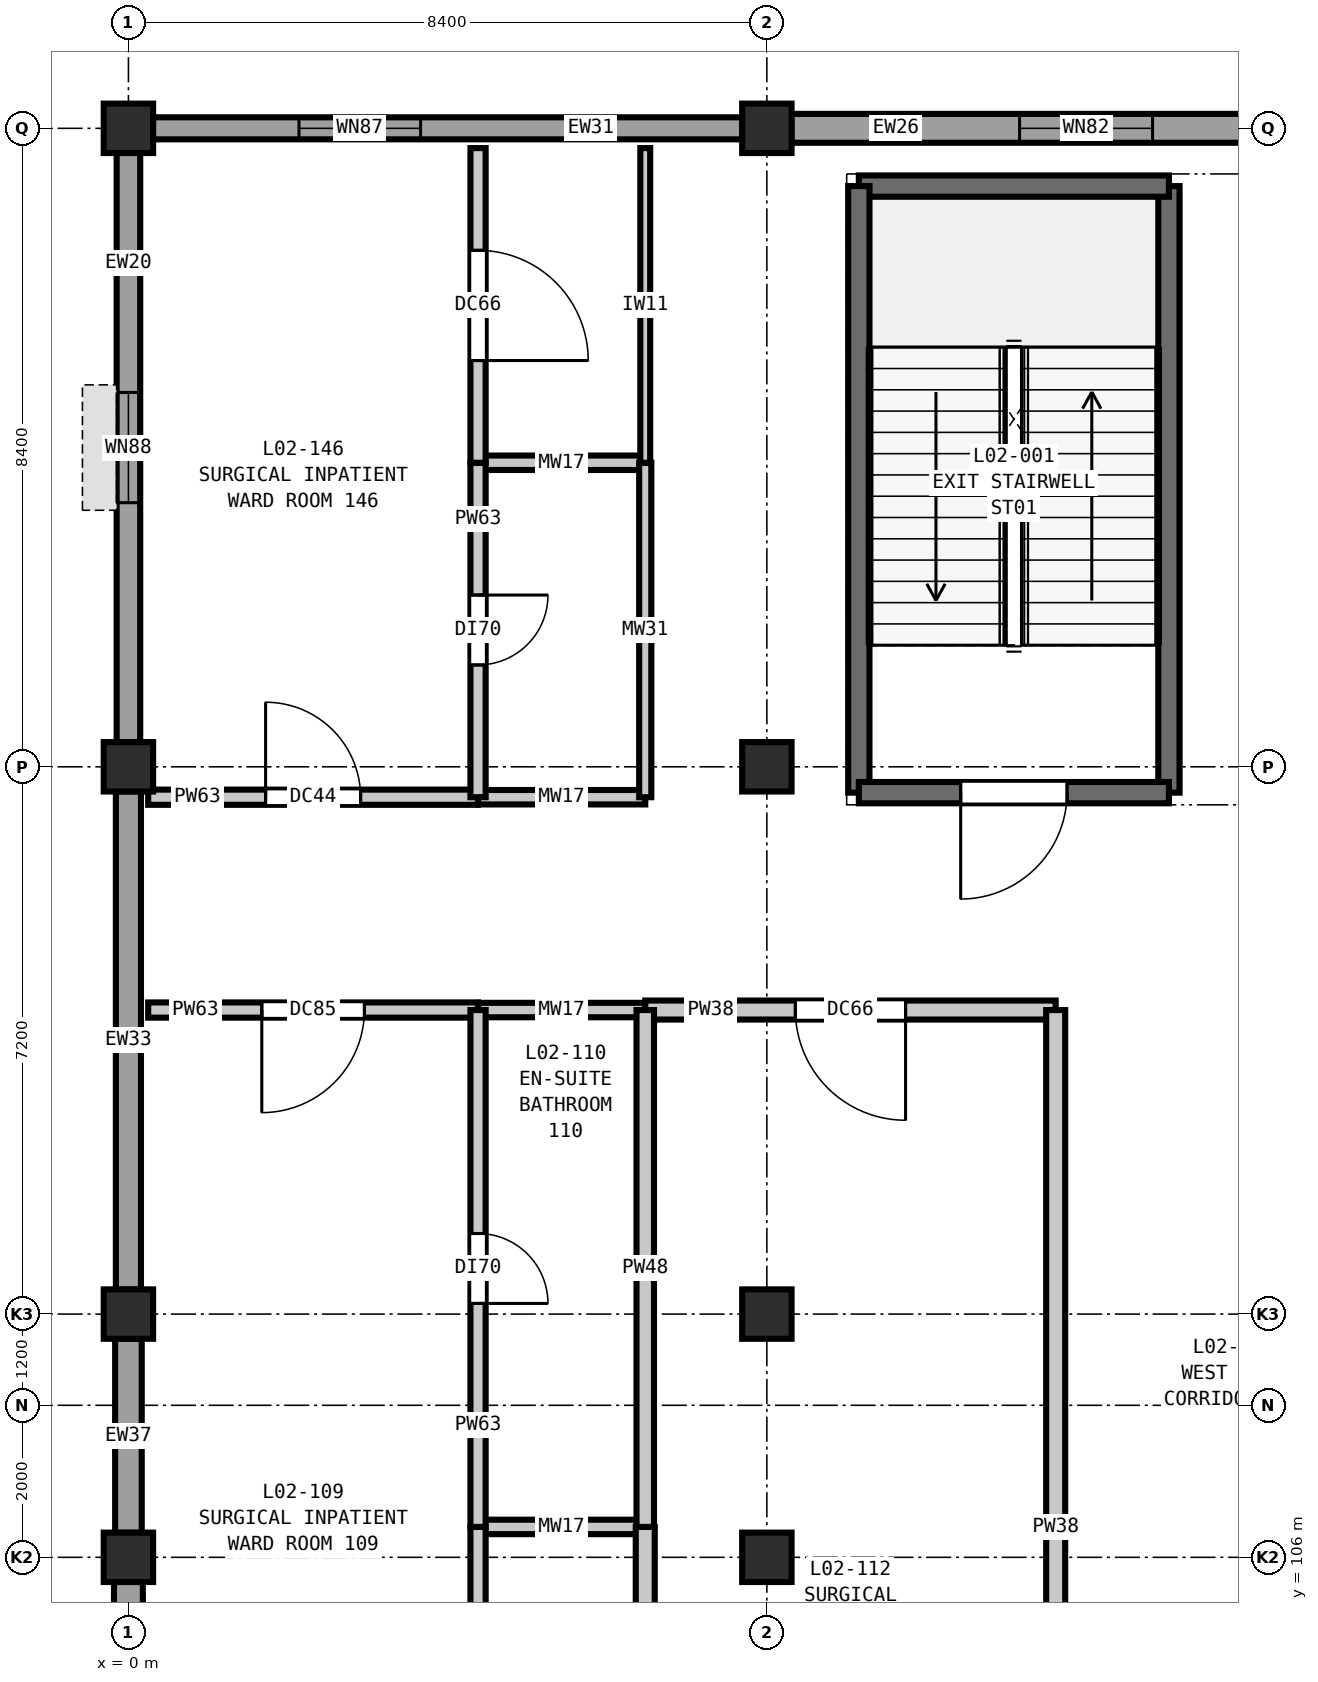
"""IFC4 building model, lengths in metres.
Left out: names, types, materials, properties, quantities, classifications, styles, units other than length and angle.
Written with IfcOpenShell. Run it as: python <this file> out.ifc"""

import sys

from ifc_helpers import new_model, si_unit, direction, frame, frame_2d, origin, origin_2d, place, context, subcontext, project, spatial, rectangle, extrude, element, fill, save


model = new_model("IFC4")
c1 = context("Model", 3, precision=1e-05, world=origin(), true_north=direction((0.0, 1.0)))
c2 = subcontext(c1, "Body", "Model", "MODEL_VIEW")
j1 = project(units=[si_unit("LENGTHUNIT", "METRE"), si_unit("PLANEANGLEUNIT", "RADIAN")], contexts=[c1])
p1 = place(None, origin())
s1 = spatial("IfcSite", under=j1, at=p1, CompositionType="ELEMENT")
p2 = place(p1, origin())
s2 = spatial("IfcBuilding", under=s1, at=p2, CompositionType="ELEMENT")
p3 = place(p2, frame((0.0, 0.0, 10.8)))
s3 = spatial("IfcBuildingStorey", under=s2, at=p3, CompositionType="ELEMENT", Elevation=10.8)
for number, where, z_axis, x_axis in (
    (1, (0.0, 106.0, 0.0), (0.0, 0.0, 1.0), (1.0, 0.0, 0.0)),
    (2, (0.0, 109.2, 0.0), (0.0, 0.0, 1.0), (1.0, 0.0, 0.0)),
    (3, (0.0, 116.4, 0.0), (0.0, 0.0, 1.0), (1.0, 0.0, 0.0)),
    (4, (0.0, 124.8, 0.0), (0.0, 0.0, 1.0), (1.0, 0.0, 0.0)),
    (5, (8.4, 106.0, 0.0), (0.0, 0.0, 1.0), (1.0, 0.0, 0.0)),
    (6, (8.4, 109.2, 0.0), (0.0, 0.0, 1.0), (1.0, 0.0, 0.0)),
    (7, (8.4, 116.4, 0.0), (0.0, 0.0, 1.0), (1.0, 0.0, 0.0)),
    (8, (8.4, 124.8, 0.0), (0.0, 0.0, 1.0), (1.0, 0.0, 0.0)),
):
    element("IfcColumn", number, at=place(p3, frame(where, z_axis=z_axis, x_axis=x_axis)), inside=s3, PredefinedType="COLUMN", context=c2, shape_type="SweptSolid", body=[
        extrude(rectangle(XDim=0.65, YDim=0.65, at=origin_2d()), origin(), (0.0, 0.0, 1.0), 5.4),
    ])
p4 = place(p3, frame((0.0, 103.123, 0.0), z_axis=(0.0, 0.0, 1.0), x_axis=(0.0, 1.0, 0.0)))
e9 = element("IfcWall", 9, at=p4, inside=s3, PredefinedType="SOLIDWALL", context=c2, shape_type="SweptSolid", body=[
    extrude(rectangle(XDim=2.554, YDim=0.38, at=frame_2d((1.277, 0.0))), origin(), (0.0, 0.0, 1.0), 4.68),
])
p5 = place(p3, frame((0.0, 106.323, 0.0), z_axis=(0.0, 0.0, 1.0), x_axis=(0.0, 1.0, 0.0)))
e10 = element("IfcWall", 10, at=p5, inside=s3, PredefinedType="SOLIDWALL", context=c2, shape_type="SweptSolid", body=[
    extrude(rectangle(XDim=2.554, YDim=0.35, at=frame_2d((1.277, 0.0))), origin(), (0.0, 0.0, 1.0), 4.68),
])
p6 = place(p3, frame((0.0, 109.523, 0.0), z_axis=(0.0, 0.0, 1.0), x_axis=(0.0, 1.0, 0.0)))
e11 = element("IfcWall", 11, at=p6, inside=s3, PredefinedType="SOLIDWALL", context=c2, shape_type="SweptSolid", body=[
    extrude(rectangle(XDim=6.554, YDim=0.33, at=frame_2d((3.277, 0.0))), origin(), (0.0, 0.0, 1.0), 4.68),
])
p7 = place(p3, frame((0.0, 116.723, 0.0), z_axis=(0.0, 0.0, 1.0), x_axis=(0.0, 1.0, 0.0)))
e12 = element("IfcWall", 12, at=p7, inside=s3, PredefinedType="SOLIDWALL", context=c2, shape_type="SweptSolid", body=[
    extrude(rectangle(XDim=7.754, YDim=0.31, at=frame_2d((3.877, 0.0))), origin(), (0.0, 0.0, 1.0), 4.68),
])
p8 = place(p7, frame((3.152, 0.0, 0.9)))
e13 = element("IfcOpeningElement", 13, at=p8, cuts=e12, PredefinedType="OPENING", context=c2, shape_type="SweptSolid", body=[
    extrude(rectangle(XDim=1.45, YDim=1.75, at=frame_2d((0.725, 0.875))), frame((0.0, 0.165, 0.0), z_axis=(0.0, -1.0, 0.0), x_axis=(1.0, 0.0, 0.0)), (0.0, 0.0, 1.0), 0.33),
])
p9 = place(p3, frame((0.323, 124.8, 0.0), z_axis=(0.0, 0.0, 1.0), x_axis=(1.0, 0.0, 0.0)))
e14 = element("IfcWall", 14, at=p9, inside=s3, PredefinedType="SOLIDWALL", context=c2, shape_type="SweptSolid", body=[
    extrude(rectangle(XDim=7.754, YDim=0.29, at=frame_2d((3.877, 0.0))), origin(), (0.0, 0.0, 1.0), 4.68),
])
p10 = place(p9, frame((1.921, 0.0, 0.9)))
e15 = element("IfcOpeningElement", 15, at=p10, cuts=e14, PredefinedType="OPENING", context=c2, shape_type="SweptSolid", body=[
    extrude(rectangle(XDim=1.6, YDim=1.75, at=frame_2d((0.8, 0.875))), frame((0.0, 0.155, 0.0), z_axis=(0.0, -1.0, 0.0), x_axis=(1.0, 0.0, 0.0)), (0.0, 0.0, 1.0), 0.31),
])
p11 = place(p3, frame((8.723, 124.8, 0.0), z_axis=(0.0, 0.0, 1.0), x_axis=(1.0, 0.0, 0.0)))
e16 = element("IfcWall", 16, at=p11, inside=s3, PredefinedType="SOLIDWALL", context=c2, shape_type="SweptSolid", body=[
    extrude(rectangle(XDim=7.754, YDim=0.38, at=frame_2d((3.877, 0.0))), origin(), (0.0, 0.0, 1.0), 4.68),
])
p12 = place(p11, frame((3.002, 0.0, 0.9)))
e17 = element("IfcOpeningElement", 17, at=p12, cuts=e16, PredefinedType="OPENING", context=c2, shape_type="SweptSolid", body=[
    extrude(rectangle(XDim=1.75, YDim=1.75, at=frame_2d((0.875, 0.875))), frame((0.0, 0.2, 0.0), z_axis=(0.0, -1.0, 0.0), x_axis=(1.0, 0.0, 0.0)), (0.0, 0.0, 1.0), 0.4),
])
p13 = place(p3, frame((13.69, 116.06, 0.0), z_axis=(0.0, 0.0, 1.0), x_axis=(0.0, 1.0, 0.0)))
e18 = element("IfcWall", 18, at=p13, inside=s3, PredefinedType="SHEAR", context=c2, shape_type="SweptSolid", body=[
    extrude(rectangle(XDim=7.98, YDim=0.28, at=frame_2d((3.99, 0.0))), origin(), (0.0, 0.0, 1.0), 5.4),
])
p14 = place(p3, frame((13.69, 124.04, 0.0), z_axis=(0.0, 0.0, 1.0), x_axis=(-1.0, 0.0, 0.0)))
e19 = element("IfcWall", 19, at=p14, inside=s3, PredefinedType="SHEAR", context=c2, shape_type="SweptSolid", body=[
    extrude(rectangle(XDim=4.08, YDim=0.28, at=frame_2d((2.04, 0.0))), origin(), (0.0, 0.0, 1.0), 5.4),
])
p15 = place(p3, frame((9.61, 124.04, 0.0), z_axis=(0.0, 0.0, 1.0), x_axis=(0.0, -1.0, 0.0)))
e20 = element("IfcWall", 20, at=p15, inside=s3, PredefinedType="SHEAR", context=c2, shape_type="SweptSolid", body=[
    extrude(rectangle(XDim=7.98, YDim=0.28, at=frame_2d((3.99, 0.0))), origin(), (0.0, 0.0, 1.0), 5.4),
])
p16 = place(p3, frame((9.61, 116.06, 0.0), z_axis=(0.0, 0.0, 1.0), x_axis=(1.0, 0.0, 0.0)))
e21 = element("IfcWall", 21, at=p16, inside=s3, PredefinedType="SHEAR", context=c2, shape_type="SweptSolid", body=[
    extrude(rectangle(XDim=4.08, YDim=0.28, at=frame_2d((2.04, 0.0))), origin(), (0.0, 0.0, 1.0), 5.4),
])
p17 = place(p16, frame((1.34, 0.0, 0.0)))
e22 = element("IfcOpeningElement", 22, at=p17, cuts=e21, PredefinedType="OPENING", context=c2, shape_type="SweptSolid", body=[
    extrude(rectangle(XDim=1.4, YDim=2.2, at=frame_2d((0.7, 1.1))), frame((0.0, 0.15, 0.0), z_axis=(0.0, -1.0, 0.0), x_axis=(1.0, 0.0, 0.0)), (0.0, 0.0, 1.0), 0.3),
])
p18 = place(p3, frame((4.6, 106.4, 0.0), z_axis=(0.0, 0.0, 1.0), x_axis=(1.0, 0.0, 0.0)))
e23 = element("IfcWall", 23, at=p18, inside=s3, PredefinedType="PLUMBINGWALL", context=c2, shape_type="SweptSolid", body=[
    extrude(rectangle(XDim=2.2, YDim=0.19, at=frame_2d((1.1, 0.0))), origin(), (0.0, 0.0, 1.0), 5.07),
])
p19 = place(p3, frame((0.26, 113.2, 0.0), z_axis=(0.0, 0.0, 1.0), x_axis=(1.0, 0.0, 0.0)))
e24 = element("IfcWall", 24, at=p19, inside=s3, PredefinedType="PARTITIONING", context=c2, shape_type="SweptSolid", body=[
    extrude(rectangle(XDim=4.34, YDim=0.2, at=frame_2d((2.17, 0.0))), origin(), (0.0, 0.0, 1.0), 5.07),
])
p20 = place(p19, frame((1.495, 0.0, 0.0)))
e25 = element("IfcOpeningElement", 25, at=p20, cuts=e24, PredefinedType="OPENING", context=c2, shape_type="SweptSolid", body=[
    extrude(rectangle(XDim=1.35, YDim=2.2, at=frame_2d((0.675, 1.1))), frame((0.0, 0.11, 0.0), z_axis=(0.0, -1.0, 0.0), x_axis=(1.0, 0.0, 0.0)), (0.0, 0.0, 1.0), 0.22),
])
p21 = place(p3, frame((4.6, 113.2, 0.0), z_axis=(0.0, 0.0, 1.0), x_axis=(1.0, 0.0, 0.0)))
e26 = element("IfcWall", 26, at=p21, inside=s3, PredefinedType="PLUMBINGWALL", context=c2, shape_type="SweptSolid", body=[
    extrude(rectangle(XDim=2.2, YDim=0.19, at=frame_2d((1.1, 0.0))), origin(), (0.0, 0.0, 1.0), 5.07),
])
p22 = place(p3, frame((6.8, 113.2, 0.0), z_axis=(0.0, 0.0, 1.0), x_axis=(1.0, 0.0, 0.0)))
e27 = element("IfcWall", 27, at=p22, inside=s3, PredefinedType="PARTITIONING", context=c2, shape_type="SweptSolid", body=[
    extrude(rectangle(XDim=5.4, YDim=0.25, at=frame_2d((2.7, 0.0))), origin(), (0.0, 0.0, 1.0), 5.07),
])
p23 = place(p22, frame((1.975, 0.0, 0.0)))
e28 = element("IfcOpeningElement", 28, at=p23, cuts=e27, PredefinedType="OPENING", context=c2, shape_type="SweptSolid", body=[
    extrude(rectangle(XDim=1.45, YDim=2.25, at=frame_2d((0.725, 1.125))), frame((0.0, 0.135, 0.0), z_axis=(0.0, -1.0, 0.0), x_axis=(1.0, 0.0, 0.0)), (0.0, 0.0, 1.0), 0.27),
])
p24 = place(p3, frame((0.26, 116.0, 0.0), z_axis=(0.0, 0.0, 1.0), x_axis=(1.0, 0.0, 0.0)))
e29 = element("IfcWall", 29, at=p24, inside=s3, PredefinedType="PARTITIONING", context=c2, shape_type="SweptSolid", body=[
    extrude(rectangle(XDim=4.34, YDim=0.2, at=frame_2d((2.17, 0.0))), origin(), (0.0, 0.0, 1.0), 5.07),
])
p25 = place(p24, frame((1.545, 0.0, 0.0)))
e30 = element("IfcOpeningElement", 30, at=p25, cuts=e29, PredefinedType="OPENING", context=c2, shape_type="SweptSolid", body=[
    extrude(rectangle(XDim=1.25, YDim=2.15, at=frame_2d((0.625, 1.075))), frame((0.0, 0.11, 0.0), z_axis=(0.0, -1.0, 0.0), x_axis=(1.0, 0.0, 0.0)), (0.0, 0.0, 1.0), 0.22),
])
for number, where, z_axis, x_axis in (
    (31, (4.6, 116.0, 0.0), (0.0, 0.0, 1.0), (1.0, 0.0, 0.0)),
    (32, (4.6, 120.4, 0.0), (0.0, 0.0, 1.0), (1.0, 0.0, 0.0)),
):
    element("IfcWall", number, at=place(p3, frame(where, z_axis=z_axis, x_axis=x_axis)), inside=s3, PredefinedType="PLUMBINGWALL", context=c2, shape_type="SweptSolid", body=[
        extrude(rectangle(XDim=2.2, YDim=0.19, at=frame_2d((1.1, 0.0))), origin(), (0.0, 0.0, 1.0), 5.07),
    ])
p26 = place(p3, frame((4.6, 99.6, 0.0), z_axis=(0.0, 0.0, 1.0), x_axis=(0.0, 1.0, 0.0)))
e33 = element("IfcWall", 33, at=p26, inside=s3, PredefinedType="PARTITIONING", context=c2, shape_type="SweptSolid", body=[
    extrude(rectangle(XDim=6.8, YDim=0.2, at=frame_2d((3.4, 0.0))), origin(), (0.0, 0.0, 1.0), 5.07),
])
p27 = place(p26, frame((2.775, 0.0, 0.0)))
e34 = element("IfcOpeningElement", 34, at=p27, cuts=e33, PredefinedType="OPENING", context=c2, shape_type="SweptSolid", body=[
    extrude(rectangle(XDim=1.25, YDim=2.15, at=frame_2d((0.625, 1.075))), frame((0.0, 0.11, 0.0), z_axis=(0.0, -1.0, 0.0), x_axis=(1.0, 0.0, 0.0)), (0.0, 0.0, 1.0), 0.22),
])
p28 = place(p3, frame((4.6, 106.4, 0.0), z_axis=(0.0, 0.0, 1.0), x_axis=(0.0, 1.0, 0.0)))
e35 = element("IfcWall", 35, at=p28, inside=s3, PredefinedType="PARTITIONING", context=c2, shape_type="SweptSolid", body=[
    extrude(rectangle(XDim=6.8, YDim=0.2, at=frame_2d((3.4, 0.0))), origin(), (0.0, 0.0, 1.0), 5.07),
])
p29 = place(p28, frame((2.94, 0.0, 0.0)))
e36 = element("IfcOpeningElement", 36, at=p29, cuts=e35, PredefinedType="OPENING", context=c2, shape_type="SweptSolid", body=[
    extrude(rectangle(XDim=0.92, YDim=2.1, at=frame_2d((0.46, 1.05))), frame((0.0, 0.11, 0.0), z_axis=(0.0, -1.0, 0.0), x_axis=(1.0, 0.0, 0.0)), (0.0, 0.0, 1.0), 0.22),
])
p30 = place(p3, frame((4.6, 116.0, 0.0), z_axis=(0.0, 0.0, 1.0), x_axis=(0.0, 1.0, 0.0)))
e37 = element("IfcWall", 37, at=p30, inside=s3, PredefinedType="PARTITIONING", context=c2, shape_type="SweptSolid", body=[
    extrude(rectangle(XDim=4.4, YDim=0.2, at=frame_2d((2.2, 0.0))), origin(), (0.0, 0.0, 1.0), 5.07),
])
p31 = place(p30, frame((1.74, 0.0, 0.0)))
e38 = element("IfcOpeningElement", 38, at=p31, cuts=e37, PredefinedType="OPENING", context=c2, shape_type="SweptSolid", body=[
    extrude(rectangle(XDim=0.92, YDim=2.1, at=frame_2d((0.46, 1.05))), frame((0.0, 0.11, 0.0), z_axis=(0.0, -1.0, 0.0), x_axis=(1.0, 0.0, 0.0)), (0.0, 0.0, 1.0), 0.22),
])
p32 = place(p3, frame((4.6, 120.4, 0.0), z_axis=(0.0, 0.0, 1.0), x_axis=(0.0, 1.0, 0.0)))
e39 = element("IfcWall", 39, at=p32, inside=s3, PredefinedType="PARTITIONING", context=c2, shape_type="SweptSolid", body=[
    extrude(rectangle(XDim=4.14, YDim=0.2, at=frame_2d((2.07, 0.0))), origin(), (0.0, 0.0, 1.0), 5.07),
])
p33 = place(p32, frame((1.345, 0.0, 0.0)))
e40 = element("IfcOpeningElement", 40, at=p33, cuts=e39, PredefinedType="OPENING", context=c2, shape_type="SweptSolid", body=[
    extrude(rectangle(XDim=1.45, YDim=2.25, at=frame_2d((0.725, 1.125))), frame((0.0, 0.11, 0.0), z_axis=(0.0, -1.0, 0.0), x_axis=(1.0, 0.0, 0.0)), (0.0, 0.0, 1.0), 0.22),
])
p34 = place(p3, frame((6.8, 99.6, 0.0), z_axis=(0.0, 0.0, 1.0), x_axis=(0.0, 1.0, 0.0)))
e41 = element("IfcWall", 41, at=p34, inside=s3, PredefinedType="PARTITIONING", context=c2, shape_type="SweptSolid", body=[
    extrude(rectangle(XDim=6.8, YDim=0.25, at=frame_2d((3.4, 0.0))), origin(), (0.0, 0.0, 1.0), 5.07),
])
p35 = place(p3, frame((6.8, 106.4, 0.0), z_axis=(0.0, 0.0, 1.0), x_axis=(0.0, 1.0, 0.0)))
e42 = element("IfcWall", 42, at=p35, inside=s3, PredefinedType="PARTITIONING", context=c2, shape_type="SweptSolid", body=[
    extrude(rectangle(XDim=6.8, YDim=0.23, at=frame_2d((3.4, 0.0))), origin(), (0.0, 0.0, 1.0), 5.07),
])
p36 = place(p3, frame((6.8, 116.0, 0.0), z_axis=(0.0, 0.0, 1.0), x_axis=(0.0, 1.0, 0.0)))
e43 = element("IfcWall", 43, at=p36, inside=s3, PredefinedType="PLUMBINGWALL", context=c2, shape_type="SweptSolid", body=[
    extrude(rectangle(XDim=4.4, YDim=0.16, at=frame_2d((2.2, 0.0))), origin(), (0.0, 0.0, 1.0), 5.07),
])
p37 = place(p3, frame((6.8, 120.4, 0.0), z_axis=(0.0, 0.0, 1.0), x_axis=(0.0, 1.0, 0.0)))
e44 = element("IfcWall", 44, at=p37, inside=s3, PredefinedType="PARTITIONING", context=c2, shape_type="SweptSolid", body=[
    extrude(rectangle(XDim=4.14, YDim=0.13, at=frame_2d((2.07, 0.0))), origin(), (0.0, 0.0, 1.0), 5.07),
])
p38 = place(p3, frame((12.2, 99.6, 0.0), z_axis=(0.0, 0.0, 1.0), x_axis=(0.0, 1.0, 0.0)))
e45 = element("IfcWall", 45, at=p38, inside=s3, PredefinedType="PARTITIONING", context=c2, shape_type="SweptSolid", body=[
    extrude(rectangle(XDim=13.6, YDim=0.25, at=frame_2d((6.8, 0.0))), origin(), (0.0, 0.0, 1.0), 5.07),
])
p39 = place(p8, origin())
e46 = element("IfcWindow", 46, at=p39, inside=s3, PartitioningType="SINGLE_PANEL", PredefinedType="WINDOW", context=c2, shape_type="SweptSolid", body=[
    extrude(rectangle(XDim=1.45, YDim=1.75, at=frame_2d((0.725, 0.875))), frame((0.0, 0.03, 0.0), z_axis=(0.0, -1.0, 0.0), x_axis=(1.0, 0.0, 0.0)), (0.0, 0.0, 1.0), 0.06),
])
fill(e13, e46)
p40 = place(p10, origin())
e47 = element("IfcWindow", 47, at=p40, inside=s3, PartitioningType="DOUBLE_PANEL_VERTICAL", PredefinedType="WINDOW", context=c2, shape_type="SweptSolid", body=[
    extrude(rectangle(XDim=1.6, YDim=1.75, at=frame_2d((0.8, 0.875))), frame((0.0, 0.03, 0.0), z_axis=(0.0, -1.0, 0.0), x_axis=(1.0, 0.0, 0.0)), (0.0, 0.0, 1.0), 0.06),
])
fill(e15, e47)
p41 = place(p12, origin())
e48 = element("IfcWindow", 48, at=p41, inside=s3, PartitioningType="DOUBLE_PANEL_VERTICAL", PredefinedType="WINDOW", context=c2, shape_type="SweptSolid", body=[
    extrude(rectangle(XDim=1.75, YDim=1.75, at=frame_2d((0.875, 0.875))), frame((0.0, 0.03, 0.0), z_axis=(0.0, -1.0, 0.0), x_axis=(1.0, 0.0, 0.0)), (0.0, 0.0, 1.0), 0.06),
])
fill(e17, e48)
p42 = place(p17, frame((1.4, 0.0, 0.0), z_axis=(0.0, 0.0, 1.0), x_axis=(-1.0, 0.0, 0.0)))
e49 = element("IfcDoor", 49, at=p42, inside=s3, OperationType="SINGLE_SWING_RIGHT", PredefinedType="DOOR", context=c2, shape_type="SweptSolid", body=[
    extrude(rectangle(XDim=1.4, YDim=2.2, at=frame_2d((0.7, 1.1))), frame((0.0, 0.025, 0.0), z_axis=(0.0, -1.0, 0.0), x_axis=(1.0, 0.0, 0.0)), (0.0, 0.0, 1.0), 0.05),
])
fill(e22, e49)
p43 = place(p20, frame((1.35, 0.0, 0.0), z_axis=(0.0, 0.0, 1.0), x_axis=(-1.0, 0.0, 0.0)))
e50 = element("IfcDoor", 50, at=p43, inside=s3, OperationType="SINGLE_SWING_RIGHT", PredefinedType="DOOR", context=c2, shape_type="SweptSolid", body=[
    extrude(rectangle(XDim=1.35, YDim=2.2, at=frame_2d((0.675, 1.1))), frame((0.0, 0.025, 0.0), z_axis=(0.0, -1.0, 0.0), x_axis=(1.0, 0.0, 0.0)), (0.0, 0.0, 1.0), 0.05),
])
fill(e25, e50)
p44 = place(p23, frame((1.45, 0.0, 0.0), z_axis=(0.0, 0.0, 1.0), x_axis=(-1.0, 0.0, 0.0)))
e51 = element("IfcDoor", 51, at=p44, inside=s3, OperationType="SINGLE_SWING_LEFT", PredefinedType="DOOR", context=c2, shape_type="SweptSolid", body=[
    extrude(rectangle(XDim=1.45, YDim=2.25, at=frame_2d((0.725, 1.125))), frame((0.0, 0.025, 0.0), z_axis=(0.0, -1.0, 0.0), x_axis=(1.0, 0.0, 0.0)), (0.0, 0.0, 1.0), 0.05),
])
fill(e28, e51)
p45 = place(p25, origin())
e52 = element("IfcDoor", 52, at=p45, inside=s3, OperationType="SINGLE_SWING_LEFT", PredefinedType="DOOR", context=c2, shape_type="SweptSolid", body=[
    extrude(rectangle(XDim=1.25, YDim=2.15, at=frame_2d((0.625, 1.075))), frame((0.0, 0.025, 0.0), z_axis=(0.0, -1.0, 0.0), x_axis=(1.0, 0.0, 0.0)), (0.0, 0.0, 1.0), 0.05),
])
fill(e30, e52)
p46 = place(p29, frame((0.92, 0.0, 0.0), z_axis=(0.0, 0.0, 1.0), x_axis=(-1.0, 0.0, 0.0)))
e53 = element("IfcDoor", 53, at=p46, inside=s3, OperationType="SINGLE_SWING_RIGHT", PredefinedType="DOOR", context=c2, shape_type="SweptSolid", body=[
    extrude(rectangle(XDim=0.92, YDim=2.1, at=frame_2d((0.46, 1.05))), frame((0.0, 0.025, 0.0), z_axis=(0.0, -1.0, 0.0), x_axis=(1.0, 0.0, 0.0)), (0.0, 0.0, 1.0), 0.05),
])
fill(e36, e53)
p47 = place(p31, frame((0.92, 0.0, 0.0), z_axis=(0.0, 0.0, 1.0), x_axis=(-1.0, 0.0, 0.0)))
e54 = element("IfcDoor", 54, at=p47, inside=s3, OperationType="SINGLE_SWING_LEFT", PredefinedType="DOOR", context=c2, shape_type="SweptSolid", body=[
    extrude(rectangle(XDim=0.92, YDim=2.1, at=frame_2d((0.46, 1.05))), frame((0.0, 0.025, 0.0), z_axis=(0.0, -1.0, 0.0), x_axis=(1.0, 0.0, 0.0)), (0.0, 0.0, 1.0), 0.05),
])
fill(e38, e54)
p48 = place(p33, frame((1.45, 0.0, 0.0), z_axis=(0.0, 0.0, 1.0), x_axis=(-1.0, 0.0, 0.0)))
e55 = element("IfcDoor", 55, at=p48, inside=s3, OperationType="SINGLE_SWING_RIGHT", PredefinedType="DOOR", context=c2, shape_type="SweptSolid", body=[
    extrude(rectangle(XDim=1.45, YDim=2.25, at=frame_2d((0.725, 1.125))), frame((0.0, 0.025, 0.0), z_axis=(0.0, -1.0, 0.0), x_axis=(1.0, 0.0, 0.0)), (0.0, 0.0, 1.0), 0.05),
])
fill(e40, e55)
save(model, sys.argv[1])
